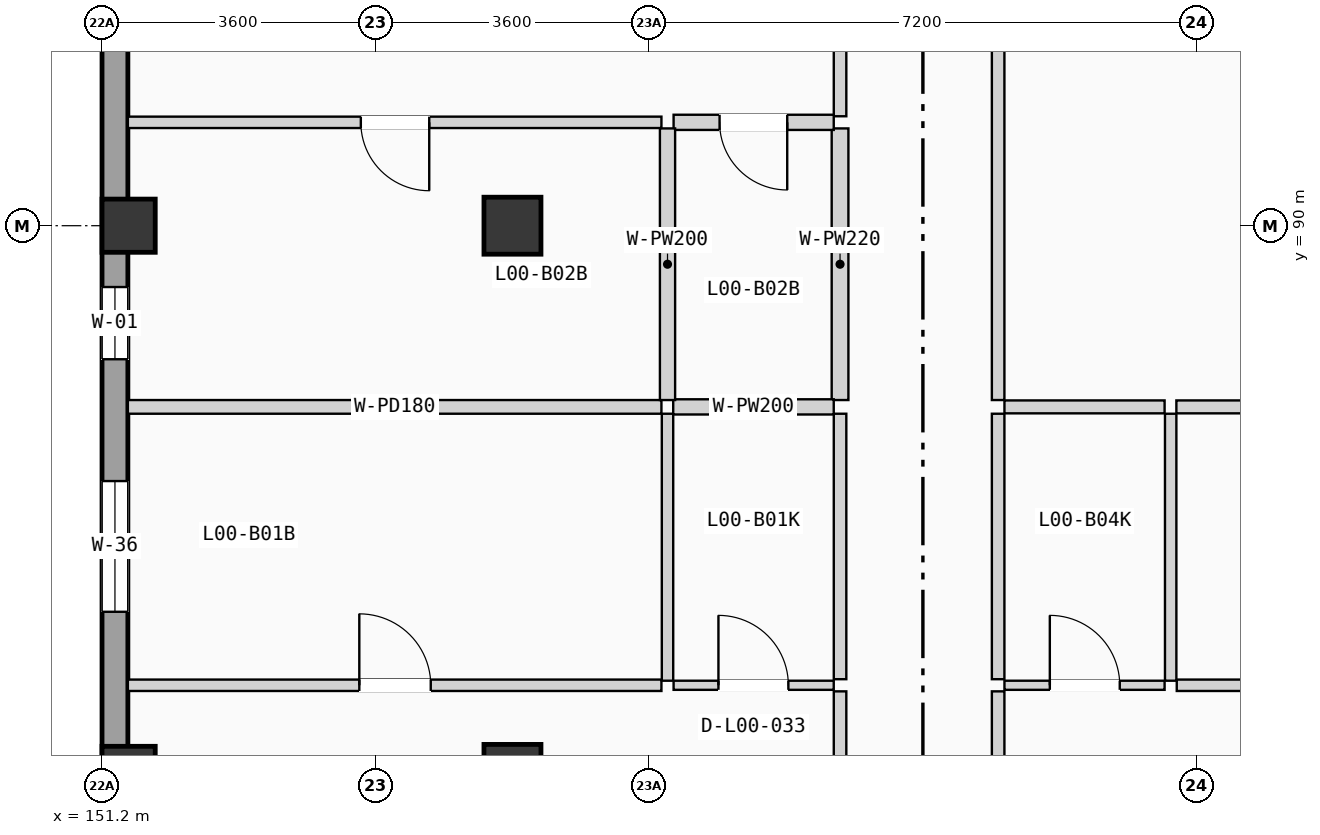
"""IFC4 building model, lengths in metres.
Left out: names, types, materials, properties, quantities, classifications, styles, units other than length and angle.
Written with IfcOpenShell. Run it as: python <this file> out.ifc"""

import sys

from ifc_helpers import new_model, si_unit, direction, frame, frame_2d, origin, origin_2d, place, context, subcontext, project, spatial, rectangle, extrude, element, fill, save


model = new_model("IFC4")
c1 = context("Model", 3, precision=1e-05, world=origin(), true_north=direction((0.0, 1.0)))
c2 = subcontext(c1, "Body", "Model", "MODEL_VIEW")
j1 = project(units=[si_unit("LENGTHUNIT", "METRE"), si_unit("PLANEANGLEUNIT", "RADIAN")], contexts=[c1])
p1 = place(None, origin())
s1 = spatial("IfcSite", under=j1, at=p1, CompositionType="ELEMENT")
p2 = place(p1, origin())
s2 = spatial("IfcBuilding", under=s1, at=p2, CompositionType="ELEMENT")
p3 = place(p2, origin())
s3 = spatial("IfcBuildingStorey", under=s2, at=p3, CompositionType="ELEMENT", Elevation=0.0)
for number, where, z_axis, x_axis in (
    (1, (151.55, 82.8, 0.0), (0.0, 0.0, 1.0), (1.0, 0.0, 0.0)),
    (2, (151.55, 90.0, 0.0), (0.0, 0.0, 1.0), (1.0, 0.0, 0.0)),
):
    element("IfcColumn", number, at=place(p3, frame(where, z_axis=z_axis, x_axis=x_axis)), inside=s3, PredefinedType="COLUMN", context=c2, shape_type="SweptSolid", body=[
        extrude(rectangle(XDim=0.7, YDim=0.7, at=origin_2d()), origin(), (0.0, 0.0, 1.0), 4.9),
    ])
for number, where, z_axis, x_axis in (
    (3, (156.6, 82.8, 0.0), (0.0, 0.0, 1.0), (1.0, 0.0, 0.0)),
    (4, (156.6, 90.0, 0.0), (0.0, 0.0, 1.0), (1.0, 0.0, 0.0)),
):
    element("IfcColumn", number, at=place(p3, frame(where, z_axis=z_axis, x_axis=x_axis)), inside=s3, PredefinedType="COLUMN", context=c2, shape_type="SweptSolid", body=[
        extrude(rectangle(XDim=0.75, YDim=0.75, at=origin_2d()), origin(), (0.0, 0.0, 1.0), 4.9),
    ])
p4 = place(p3, frame((151.37, 68.74, 0.0), z_axis=(0.0, 0.0, 1.0), x_axis=(0.0, 1.0, 0.0)))
e5 = element("IfcWall", 5, at=p4, inside=s3, PredefinedType="SOLIDWALL", context=c2, shape_type="SweptSolid", body=[
    extrude(rectangle(XDim=49.72, YDim=0.34, at=frame_2d((24.86, 0.0))), origin(), (0.0, 0.0, 1.0), 4.64),
])
p5 = place(p4, frame((11.552, 0.0, 0.9)))
e6 = element("IfcOpeningElement", 6, at=p5, cuts=e5, PredefinedType="OPENING", context=c2, shape_type="SweptSolid", body=[
    extrude(rectangle(XDim=1.6, YDim=1.65, at=frame_2d((0.8, 0.825))), frame((0.0, 0.18, 0.0), z_axis=(0.0, -1.0, 0.0), x_axis=(1.0, 0.0, 0.0)), (0.0, 0.0, 1.0), 0.36),
])
p6 = place(p4, frame((8.207, 0.0, 0.9)))
e7 = element("IfcOpeningElement", 7, at=p6, cuts=e5, PredefinedType="OPENING", context=c2, shape_type="SweptSolid", body=[
    extrude(rectangle(XDim=1.6, YDim=1.8, at=frame_2d((0.8, 0.9))), frame((0.0, 0.18, 0.0), z_axis=(0.0, -1.0, 0.0), x_axis=(1.0, 0.0, 0.0)), (0.0, 0.0, 1.0), 0.36),
])
p7 = place(p4, frame((16.18, 0.0, 0.9)))
e8 = element("IfcOpeningElement", 8, at=p7, cuts=e5, PredefinedType="OPENING", context=c2, shape_type="SweptSolid", body=[
    extrude(rectangle(XDim=1.72, YDim=1.2, at=frame_2d((0.86, 0.6))), frame((0.0, 0.18, 0.0), z_axis=(0.0, -1.0, 0.0), x_axis=(1.0, 0.0, 0.0)), (0.0, 0.0, 1.0), 0.36),
])
p8 = place(p4, frame((24.0, 0.0, 0.9)))
e9 = element("IfcOpeningElement", 9, at=p8, cuts=e5, PredefinedType="OPENING", context=c2, shape_type="SweptSolid", body=[
    extrude(rectangle(XDim=1.72, YDim=1.35, at=frame_2d((0.86, 0.675))), frame((0.0, 0.18, 0.0), z_axis=(0.0, -1.0, 0.0), x_axis=(1.0, 0.0, 0.0)), (0.0, 0.0, 1.0), 0.36),
])
p9 = place(p4, frame((19.503, 0.0, 0.85)))
e10 = element("IfcOpeningElement", 10, at=p9, cuts=e5, PredefinedType="OPENING", context=c2, shape_type="SweptSolid", body=[
    extrude(rectangle(XDim=0.95, YDim=1.2, at=frame_2d((0.475, 0.6))), frame((0.0, 0.18, 0.0), z_axis=(0.0, -1.0, 0.0), x_axis=(1.0, 0.0, 0.0)), (0.0, 0.0, 1.0), 0.36),
])
p10 = place(p4, frame((29.267, 0.0, 0.85)))
e11 = element("IfcOpeningElement", 11, at=p10, cuts=e5, PredefinedType="OPENING", context=c2, shape_type="SweptSolid", body=[
    extrude(rectangle(XDim=0.95, YDim=1.2, at=frame_2d((0.475, 0.6))), frame((0.0, 0.18, 0.0), z_axis=(0.0, -1.0, 0.0), x_axis=(1.0, 0.0, 0.0)), (0.0, 0.0, 1.0), 0.36),
])
p11 = place(p4, frame((36.508, 0.0, 0.9)))
e12 = element("IfcOpeningElement", 12, at=p11, cuts=e5, PredefinedType="OPENING", context=c2, shape_type="SweptSolid", body=[
    extrude(rectangle(XDim=1.72, YDim=1.8, at=frame_2d((0.86, 0.9))), frame((0.0, 0.18, 0.0), z_axis=(0.0, -1.0, 0.0), x_axis=(1.0, 0.0, 0.0)), (0.0, 0.0, 1.0), 0.36),
])
p12 = place(p4, frame((31.756, 0.0, 0.9)))
e13 = element("IfcOpeningElement", 13, at=p12, cuts=e5, PredefinedType="OPENING", context=c2, shape_type="SweptSolid", body=[
    extrude(rectangle(XDim=1.85, YDim=1.2, at=frame_2d((0.925, 0.6))), frame((0.0, 0.18, 0.0), z_axis=(0.0, -1.0, 0.0), x_axis=(1.0, 0.0, 0.0)), (0.0, 0.0, 1.0), 0.36),
])
p13 = place(p4, frame((39.788, 0.0, 0.9)))
e14 = element("IfcOpeningElement", 14, at=p13, cuts=e5, PredefinedType="OPENING", context=c2, shape_type="SweptSolid", body=[
    extrude(rectangle(XDim=1.85, YDim=1.35, at=frame_2d((0.925, 0.675))), frame((0.0, 0.18, 0.0), z_axis=(0.0, -1.0, 0.0), x_axis=(1.0, 0.0, 0.0)), (0.0, 0.0, 1.0), 0.36),
])
p14 = place(p3, frame((160.91, 79.653, 0.0), z_axis=(0.0, 0.0, 1.0), x_axis=(0.0, 1.0, 0.0)))
e15 = element("IfcWall", 15, at=p14, inside=s3, PredefinedType="PARTITIONING", context=c2, shape_type="SweptSolid", body=[
    extrude(rectangle(XDim=4.22, YDim=0.165, at=frame_2d((2.11, 0.0))), origin(), (0.0, 0.0, 1.0), 3.84),
])
p15 = place(p14, frame((1.605, 0.0, 0.0)))
e16 = element("IfcOpeningElement", 16, at=p15, cuts=e15, PredefinedType="OPENING", context=c2, shape_type="SweptSolid", body=[
    extrude(rectangle(XDim=1.01, YDim=2.11, at=frame_2d((0.505, 1.055))), frame((0.0, 0.093, 0.0), z_axis=(0.0, -1.0, 0.0), x_axis=(1.0, 0.0, 0.0)), (0.0, 0.0, 1.0), 0.185),
])
p16 = place(p3, frame((160.91, 84.033, 0.0), z_axis=(0.0, 0.0, 1.0), x_axis=(0.0, 1.0, 0.0)))
e17 = element("IfcWall", 17, at=p16, inside=s3, PredefinedType="PARTITIONING", context=c2, shape_type="SweptSolid", body=[
    extrude(rectangle(XDim=3.493, YDim=0.165, at=frame_2d((1.747, 0.0))), origin(), (0.0, 0.0, 1.0), 3.84),
])
p17 = place(p3, frame((160.91, 91.44, 0.0), z_axis=(0.0, 0.0, 1.0), x_axis=(0.0, 1.0, 0.0)))
e18 = element("IfcWall", 18, at=p17, inside=s3, PredefinedType="PARTITIONING", context=c2, shape_type="SweptSolid", body=[
    extrude(rectangle(XDim=4.32, YDim=0.165, at=frame_2d((2.16, 0.0))), origin(), (0.0, 0.0, 1.0), 3.84),
])
p18 = place(p17, frame((1.655, 0.0, 0.0)))
e19 = element("IfcOpeningElement", 19, at=p18, cuts=e18, PredefinedType="OPENING", context=c2, shape_type="SweptSolid", body=[
    extrude(rectangle(XDim=1.01, YDim=2.11, at=frame_2d((0.505, 1.055))), frame((0.0, 0.093, 0.0), z_axis=(0.0, -1.0, 0.0), x_axis=(1.0, 0.0, 0.0)), (0.0, 0.0, 1.0), 0.185),
])
p19 = place(p3, frame((160.91, 87.706, 0.0), z_axis=(0.0, 0.0, 1.0), x_axis=(0.0, 1.0, 0.0)))
e20 = element("IfcWall", 20, at=p19, inside=s3, PredefinedType="PLUMBINGWALL", context=c2, shape_type="SweptSolid", body=[
    extrude(rectangle(XDim=3.574, YDim=0.22, at=frame_2d((1.787, 0.0))), origin(), (0.0, 0.0, 1.0), 3.84),
])
p20 = place(p3, frame((162.99, 79.653, 0.0), z_axis=(0.0, 0.0, 1.0), x_axis=(0.0, 1.0, 0.0)))
e21 = element("IfcWall", 21, at=p20, inside=s3, PredefinedType="PARTITIONING", context=c2, shape_type="SweptSolid", body=[
    extrude(rectangle(XDim=4.22, YDim=0.165, at=frame_2d((2.11, 0.0))), origin(), (0.0, 0.0, 1.0), 3.84),
])
p21 = place(p20, frame((1.605, 0.0, 0.0)))
e22 = element("IfcOpeningElement", 22, at=p21, cuts=e21, PredefinedType="OPENING", context=c2, shape_type="SweptSolid", body=[
    extrude(rectangle(XDim=1.01, YDim=2.11, at=frame_2d((0.505, 1.055))), frame((0.0, 0.093, 0.0), z_axis=(0.0, -1.0, 0.0), x_axis=(1.0, 0.0, 0.0)), (0.0, 0.0, 1.0), 0.185),
])
p22 = place(p3, frame((162.99, 84.033, 0.0), z_axis=(0.0, 0.0, 1.0), x_axis=(0.0, 1.0, 0.0)))
e23 = element("IfcWall", 23, at=p22, inside=s3, PredefinedType="PARTITIONING", context=c2, shape_type="SweptSolid", body=[
    extrude(rectangle(XDim=3.493, YDim=0.165, at=frame_2d((1.747, 0.0))), origin(), (0.0, 0.0, 1.0), 3.84),
])
p23 = place(p3, frame((162.99, 87.706, 0.0), z_axis=(0.0, 0.0, 1.0), x_axis=(0.0, 1.0, 0.0)))
e24 = element("IfcWall", 24, at=p23, inside=s3, PredefinedType="PARTITIONING", context=c2, shape_type="SweptSolid", body=[
    extrude(rectangle(XDim=11.788, YDim=0.165, at=frame_2d((5.894, 0.0))), origin(), (0.0, 0.0, 1.0), 3.84),
])
p24 = place(p23, frame((5.389, 0.0, 0.0)))
e25 = element("IfcOpeningElement", 25, at=p24, cuts=e24, PredefinedType="OPENING", context=c2, shape_type="SweptSolid", body=[
    extrude(rectangle(XDim=1.01, YDim=2.11, at=frame_2d((0.505, 1.055))), frame((0.0, 0.093, 0.0), z_axis=(0.0, -1.0, 0.0), x_axis=(1.0, 0.0, 0.0)), (0.0, 0.0, 1.0), 0.185),
])
p25 = place(p3, frame((158.72, 83.953, 0.0), z_axis=(0.0, 0.0, 1.0), x_axis=(1.0, 0.0, 0.0)))
e26 = element("IfcWall", 26, at=p25, inside=s3, PredefinedType="PARTITIONING", context=c2, shape_type="SweptSolid", body=[
    extrude(rectangle(XDim=2.107, YDim=0.12, at=frame_2d((1.053, 0.0))), origin(), (0.0, 0.0, 1.0), 3.84),
])
p26 = place(p25, frame((0.59, 0.0, 0.0)))
e27 = element("IfcOpeningElement", 27, at=p26, cuts=e26, PredefinedType="OPENING", context=c2, shape_type="SweptSolid", body=[
    extrude(rectangle(XDim=0.92, YDim=2.02, at=frame_2d((0.46, 1.01))), frame((0.0, 0.07, 0.0), z_axis=(0.0, -1.0, 0.0), x_axis=(1.0, 0.0, 0.0)), (0.0, 0.0, 1.0), 0.14),
])
p27 = place(p3, frame((151.54, 83.953, 0.0), z_axis=(0.0, 0.0, 1.0), x_axis=(1.0, 0.0, 0.0)))
e28 = element("IfcWall", 28, at=p27, inside=s3, PredefinedType="PARTITIONING", context=c2, shape_type="SweptSolid", body=[
    extrude(rectangle(XDim=7.02, YDim=0.15, at=frame_2d((3.51, 0.0))), origin(), (0.0, 0.0, 1.0), 3.84),
])
p28 = place(p27, frame((3.045, 0.0, 0.0)))
e29 = element("IfcOpeningElement", 29, at=p28, cuts=e28, PredefinedType="OPENING", context=c2, shape_type="SweptSolid", body=[
    extrude(rectangle(XDim=0.94, YDim=2.06, at=frame_2d((0.47, 1.03))), frame((0.0, 0.085, 0.0), z_axis=(0.0, -1.0, 0.0), x_axis=(1.0, 0.0, 0.0)), (0.0, 0.0, 1.0), 0.17),
])
p29 = place(p3, frame((158.64, 84.013, 0.0), z_axis=(0.0, 0.0, 1.0), x_axis=(0.0, 1.0, 0.0)))
e30 = element("IfcWall", 30, at=p29, inside=s3, PredefinedType="PARTITIONING", context=c2, shape_type="SweptSolid", body=[
    extrude(rectangle(XDim=3.513, YDim=0.15, at=frame_2d((1.756, 0.0))), origin(), (0.0, 0.0, 1.0), 3.84),
])
p30 = place(p3, frame((158.715, 87.616, 0.0), z_axis=(0.0, 0.0, 1.0), x_axis=(1.0, 0.0, 0.0)))
e31 = element("IfcWall", 31, at=p30, inside=s3, PredefinedType="PLUMBINGWALL", context=c2, shape_type="SweptSolid", body=[
    extrude(rectangle(XDim=2.112, YDim=0.2, at=frame_2d((1.056, 0.0))), origin(), (0.0, 0.0, 1.0), 3.84),
])
p31 = place(p3, frame((151.54, 87.616, 0.0), z_axis=(0.0, 0.0, 1.0), x_axis=(1.0, 0.0, 0.0)))
e32 = element("IfcWall", 32, at=p31, inside=s3, PredefinedType="PARTITIONING", context=c2, shape_type="SweptSolid", body=[
    extrude(rectangle(XDim=7.02, YDim=0.18, at=frame_2d((3.51, 0.0))), origin(), (0.0, 0.0, 1.0), 3.84),
])
p32 = place(p3, frame((158.72, 91.36, 0.0), z_axis=(0.0, 0.0, 1.0), x_axis=(1.0, 0.0, 0.0)))
e33 = element("IfcWall", 33, at=p32, inside=s3, PredefinedType="PLUMBINGWALL", context=c2, shape_type="SweptSolid", body=[
    extrude(rectangle(XDim=2.107, YDim=0.2, at=frame_2d((1.053, 0.0))), origin(), (0.0, 0.0, 1.0), 3.84),
])
p33 = place(p32, frame((0.605, 0.0, 0.0)))
e34 = element("IfcOpeningElement", 34, at=p33, cuts=e33, PredefinedType="OPENING", context=c2, shape_type="SweptSolid", body=[
    extrude(rectangle(XDim=0.89, YDim=2.03, at=frame_2d((0.445, 1.015))), frame((0.0, 0.11, 0.0), z_axis=(0.0, -1.0, 0.0), x_axis=(1.0, 0.0, 0.0)), (0.0, 0.0, 1.0), 0.22),
])
p34 = place(p3, frame((151.54, 91.36, 0.0), z_axis=(0.0, 0.0, 1.0), x_axis=(1.0, 0.0, 0.0)))
e35 = element("IfcWall", 35, at=p34, inside=s3, PredefinedType="PARTITIONING", context=c2, shape_type="SweptSolid", body=[
    extrude(rectangle(XDim=7.02, YDim=0.15, at=frame_2d((3.51, 0.0))), origin(), (0.0, 0.0, 1.0), 3.84),
])
p35 = place(p34, frame((3.065, 0.0, 0.0)))
e36 = element("IfcOpeningElement", 36, at=p35, cuts=e35, PredefinedType="OPENING", context=c2, shape_type="SweptSolid", body=[
    extrude(rectangle(XDim=0.9, YDim=2.04, at=frame_2d((0.45, 1.02))), frame((0.0, 0.085, 0.0), z_axis=(0.0, -1.0, 0.0), x_axis=(1.0, 0.0, 0.0)), (0.0, 0.0, 1.0), 0.17),
])
p36 = place(p3, frame((158.64, 87.706, 0.0), z_axis=(0.0, 0.0, 1.0), x_axis=(0.0, 1.0, 0.0)))
e37 = element("IfcWall", 37, at=p36, inside=s3, PredefinedType="PLUMBINGWALL", context=c2, shape_type="SweptSolid", body=[
    extrude(rectangle(XDim=3.574, YDim=0.2, at=frame_2d((1.787, 0.0))), origin(), (0.0, 0.0, 1.0), 3.84),
])
p37 = place(p3, frame((163.073, 83.953, 0.0), z_axis=(0.0, 0.0, 1.0), x_axis=(1.0, 0.0, 0.0)))
e38 = element("IfcWall", 38, at=p37, inside=s3, PredefinedType="PARTITIONING", context=c2, shape_type="SweptSolid", body=[
    extrude(rectangle(XDim=2.107, YDim=0.12, at=frame_2d((1.053, 0.0))), origin(), (0.0, 0.0, 1.0), 3.84),
])
p38 = place(p37, frame((0.597, 0.0, 0.0)))
e39 = element("IfcOpeningElement", 39, at=p38, cuts=e38, PredefinedType="OPENING", context=c2, shape_type="SweptSolid", body=[
    extrude(rectangle(XDim=0.92, YDim=2.02, at=frame_2d((0.46, 1.01))), frame((0.0, 0.07, 0.0), z_axis=(0.0, -1.0, 0.0), x_axis=(1.0, 0.0, 0.0)), (0.0, 0.0, 1.0), 0.14),
])
p39 = place(p3, frame((165.34, 83.953, 0.0), z_axis=(0.0, 0.0, 1.0), x_axis=(1.0, 0.0, 0.0)))
e40 = element("IfcWall", 40, at=p39, inside=s3, PredefinedType="PARTITIONING", context=c2, shape_type="SweptSolid", body=[
    extrude(rectangle(XDim=7.12, YDim=0.15, at=frame_2d((3.56, 0.0))), origin(), (0.0, 0.0, 1.0), 3.84),
])
p40 = place(p39, frame((3.085, 0.0, 0.0)))
e41 = element("IfcOpeningElement", 41, at=p40, cuts=e40, PredefinedType="OPENING", context=c2, shape_type="SweptSolid", body=[
    extrude(rectangle(XDim=0.94, YDim=2.06, at=frame_2d((0.47, 1.03))), frame((0.0, 0.085, 0.0), z_axis=(0.0, -1.0, 0.0), x_axis=(1.0, 0.0, 0.0)), (0.0, 0.0, 1.0), 0.17),
])
p41 = place(p3, frame((165.26, 84.013, 0.0), z_axis=(0.0, 0.0, 1.0), x_axis=(0.0, 1.0, 0.0)))
e42 = element("IfcWall", 42, at=p41, inside=s3, PredefinedType="PARTITIONING", context=c2, shape_type="SweptSolid", body=[
    extrude(rectangle(XDim=3.513, YDim=0.15, at=frame_2d((1.756, 0.0))), origin(), (0.0, 0.0, 1.0), 3.84),
])
p42 = place(p3, frame((163.073, 87.616, 0.0), z_axis=(0.0, 0.0, 1.0), x_axis=(1.0, 0.0, 0.0)))
e43 = element("IfcWall", 43, at=p42, inside=s3, PredefinedType="PARTITIONING", context=c2, shape_type="SweptSolid", body=[
    extrude(rectangle(XDim=2.107, YDim=0.17, at=frame_2d((1.053, 0.0))), origin(), (0.0, 0.0, 1.0), 3.84),
])
p43 = place(p3, frame((165.335, 87.616, 0.0), z_axis=(0.0, 0.0, 1.0), x_axis=(1.0, 0.0, 0.0)))
e44 = element("IfcWall", 44, at=p43, inside=s3, PredefinedType="PARTITIONING", context=c2, shape_type="SweptSolid", body=[
    extrude(rectangle(XDim=7.125, YDim=0.17, at=frame_2d((3.562, 0.0))), origin(), (0.0, 0.0, 1.0), 3.84),
])
p44 = place(p7, origin())
e45 = element("IfcWindow", 45, at=p44, inside=s3, PartitioningType="DOUBLE_PANEL_VERTICAL", PredefinedType="WINDOW", context=c2, shape_type="SweptSolid", body=[
    extrude(rectangle(XDim=1.72, YDim=1.2, at=frame_2d((0.86, 0.6))), frame((0.0, 0.03, 0.0), z_axis=(0.0, -1.0, 0.0), x_axis=(1.0, 0.0, 0.0)), (0.0, 0.0, 1.0), 0.06),
])
fill(e8, e45)
p45 = place(p9, origin())
e46 = element("IfcWindow", 46, at=p45, inside=s3, PartitioningType="SINGLE_PANEL", PredefinedType="WINDOW", context=c2, shape_type="SweptSolid", body=[
    extrude(rectangle(XDim=0.95, YDim=1.2, at=frame_2d((0.475, 0.6))), frame((0.0, 0.03, 0.0), z_axis=(0.0, -1.0, 0.0), x_axis=(1.0, 0.0, 0.0)), (0.0, 0.0, 1.0), 0.06),
])
fill(e10, e46)
p46 = place(p26, origin())
e47 = element("IfcDoor", 47, at=p46, inside=s3, OperationType="SINGLE_SWING_LEFT", PredefinedType="DOOR", context=c2, shape_type="SweptSolid", body=[
    extrude(rectangle(XDim=0.92, YDim=2.02, at=frame_2d((0.46, 1.01))), frame((0.0, 0.025, 0.0), z_axis=(0.0, -1.0, 0.0), x_axis=(1.0, 0.0, 0.0)), (0.0, 0.0, 1.0), 0.05),
])
fill(e27, e47)
p47 = place(p28, origin())
e48 = element("IfcDoor", 48, at=p47, inside=s3, OperationType="SINGLE_SWING_LEFT", PredefinedType="DOOR", context=c2, shape_type="SweptSolid", body=[
    extrude(rectangle(XDim=0.94, YDim=2.06, at=frame_2d((0.47, 1.03))), frame((0.0, 0.025, 0.0), z_axis=(0.0, -1.0, 0.0), x_axis=(1.0, 0.0, 0.0)), (0.0, 0.0, 1.0), 0.05),
])
fill(e29, e48)
p48 = place(p33, frame((0.89, 0.0, 0.0), z_axis=(0.0, 0.0, 1.0), x_axis=(-1.0, 0.0, 0.0)))
e49 = element("IfcDoor", 49, at=p48, inside=s3, OperationType="SINGLE_SWING_RIGHT", PredefinedType="DOOR", context=c2, shape_type="SweptSolid", body=[
    extrude(rectangle(XDim=0.89, YDim=2.03, at=frame_2d((0.445, 1.015))), frame((0.0, 0.025, 0.0), z_axis=(0.0, -1.0, 0.0), x_axis=(1.0, 0.0, 0.0)), (0.0, 0.0, 1.0), 0.05),
])
fill(e34, e49)
p49 = place(p35, frame((0.9, 0.0, 0.0), z_axis=(0.0, 0.0, 1.0), x_axis=(-1.0, 0.0, 0.0)))
e50 = element("IfcDoor", 50, at=p49, inside=s3, OperationType="SINGLE_SWING_RIGHT", PredefinedType="DOOR", context=c2, shape_type="SweptSolid", body=[
    extrude(rectangle(XDim=0.9, YDim=2.04, at=frame_2d((0.45, 1.02))), frame((0.0, 0.025, 0.0), z_axis=(0.0, -1.0, 0.0), x_axis=(1.0, 0.0, 0.0)), (0.0, 0.0, 1.0), 0.05),
])
fill(e36, e50)
p50 = place(p38, origin())
e51 = element("IfcDoor", 51, at=p50, inside=s3, OperationType="SINGLE_SWING_LEFT", PredefinedType="DOOR", context=c2, shape_type="SweptSolid", body=[
    extrude(rectangle(XDim=0.92, YDim=2.02, at=frame_2d((0.46, 1.01))), frame((0.0, 0.025, 0.0), z_axis=(0.0, -1.0, 0.0), x_axis=(1.0, 0.0, 0.0)), (0.0, 0.0, 1.0), 0.05),
])
fill(e39, e51)
save(model, sys.argv[1])
